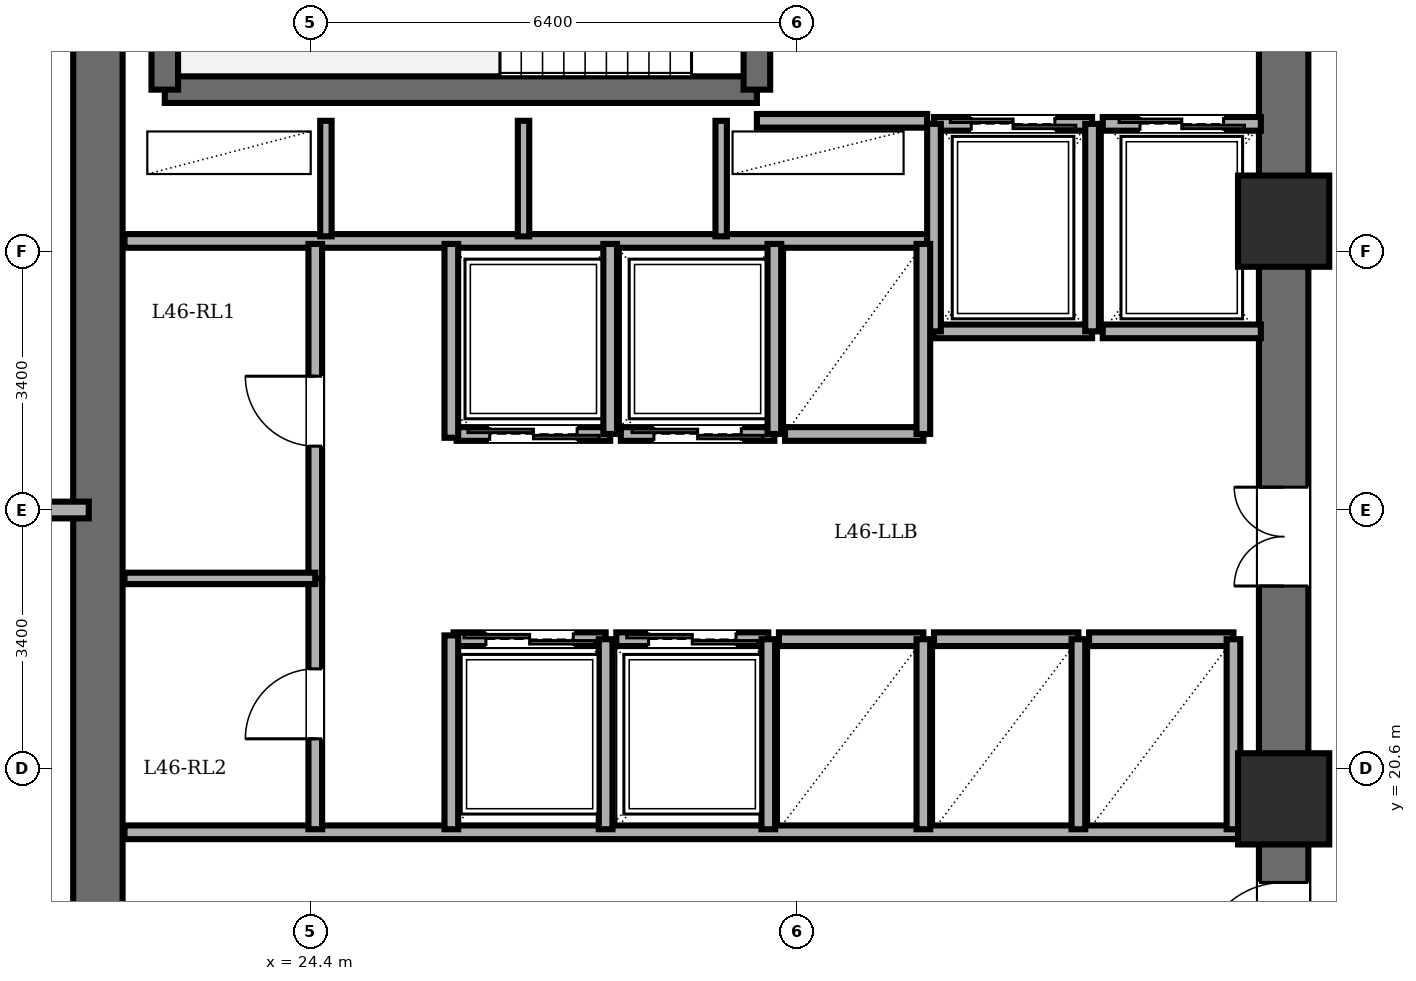
"""IFC4 building model, lengths in metres.
Left out: names, types, materials, properties, quantities, classifications, styles, units other than length and angle.
Written with IfcOpenShell. Run it as: python <this file> out.ifc"""

import sys

from ifc_helpers import new_model, si_unit, direction, frame, frame_2d, origin, origin_2d, place, context, subcontext, project, spatial, rectangle, extrude, element, fill, save


model = new_model("IFC4")
c1 = context("Model", 3, precision=1e-05, world=origin(), true_north=direction((0.0, 1.0)))
c2 = subcontext(c1, "Body", "Model", "MODEL_VIEW")
j1 = project(units=[si_unit("LENGTHUNIT", "METRE"), si_unit("PLANEANGLEUNIT", "RADIAN")], contexts=[c1])
p1 = place(None, origin())
s1 = spatial("IfcSite", under=j1, at=p1, CompositionType="ELEMENT")
p2 = place(p1, origin())
s2 = spatial("IfcBuilding", under=s1, at=p2, CompositionType="ELEMENT")
p3 = place(p2, frame((0.0, 0.0, 176.2)))
s3 = spatial("IfcBuildingStorey", under=s2, at=p3, CompositionType="ELEMENT", Elevation=176.2)
for number, where, z_axis, x_axis in (
    (1, (37.2, 20.2, 0.0), (0.0, 0.0, 1.0), (1.0, 0.0, 0.0)),
    (2, (37.2, 27.8, 0.0), (0.0, 0.0, 1.0), (1.0, 0.0, 0.0)),
):
    element("IfcColumn", number, at=place(p3, frame(where, z_axis=z_axis, x_axis=x_axis)), inside=s3, PredefinedType="COLUMN", context=c2, shape_type="SweptSolid", body=[
        extrude(rectangle(XDim=1.2, YDim=1.2, at=origin_2d()), origin(), (0.0, 0.0, 1.0), 3.6),
    ])
p4 = place(p3, frame((21.6, 14.4, 0.0), z_axis=(0.0, 0.0, 1.0), x_axis=(0.0, 1.0, 0.0)))
e3 = element("IfcWall", 3, at=p4, inside=s3, PredefinedType="SHEAR", context=c2, shape_type="SweptSolid", body=[
    extrude(rectangle(XDim=19.2, YDim=0.65, at=frame_2d((9.6, 0.0))), origin(), (0.0, 0.0, 1.0), 3.4),
])
p5 = place(p3, frame((37.2, 14.4, 0.0), z_axis=(0.0, 0.0, 1.0), x_axis=(0.0, 1.0, 0.0)))
e4 = element("IfcWall", 4, at=p5, inside=s3, PredefinedType="SHEAR", context=c2, shape_type="SweptSolid", body=[
    extrude(rectangle(XDim=19.2, YDim=0.65, at=frame_2d((9.6, 0.0))), origin(), (0.0, 0.0, 1.0), 3.4),
])
p6 = place(p5, frame((15.8, 0.0, 0.0)))
e5 = element("IfcOpeningElement", 5, at=p6, cuts=e4, PredefinedType="OPENING", context=c2, shape_type="SweptSolid", body=[
    extrude(rectangle(XDim=1.15, YDim=2.15, at=frame_2d((0.575, 1.075))), frame((0.0, 0.335, 0.0), z_axis=(0.0, -1.0, 0.0), x_axis=(1.0, 0.0, 0.0)), (0.0, 0.0, 1.0), 0.67),
])
p7 = place(p5, frame((3.6, 0.0, 0.0)))
e6 = element("IfcOpeningElement", 6, at=p7, cuts=e4, PredefinedType="OPENING", context=c2, shape_type="SweptSolid", body=[
    extrude(rectangle(XDim=1.1, YDim=2.15, at=frame_2d((0.55, 1.075))), frame((0.0, 0.335, 0.0), z_axis=(0.0, -1.0, 0.0), x_axis=(1.0, 0.0, 0.0)), (0.0, 0.0, 1.0), 0.67),
])
p8 = place(p5, frame((8.6, 0.0, 0.0)))
e7 = element("IfcOpeningElement", 7, at=p8, cuts=e4, PredefinedType="OPENING", context=c2, shape_type="SweptSolid", body=[
    extrude(rectangle(XDim=1.3, YDim=2.2, at=frame_2d((0.65, 1.1))), frame((0.0, 0.335, 0.0), z_axis=(0.0, -1.0, 0.0), x_axis=(1.0, 0.0, 0.0)), (0.0, 0.0, 1.0), 0.67),
])
p9 = place(p3, frame((22.48, 29.53, 0.0), z_axis=(0.0, 0.0, 1.0), x_axis=(1.0, 0.0, 0.0)))
e8 = element("IfcWall", 8, at=p9, inside=s3, PredefinedType="SOLIDWALL", context=c2, shape_type="SweptSolid", body=[
    extrude(rectangle(XDim=7.79, YDim=0.35, at=frame_2d((3.895, 0.0))), origin(), (0.0, 0.0, 1.0), 3.4),
])
p10 = place(p3, frame((22.48, 29.53, 0.0), z_axis=(0.0, 0.0, 1.0), x_axis=(0.0, 1.0, 0.0)))
e9 = element("IfcWall", 9, at=p10, inside=s3, PredefinedType="SOLIDWALL", context=c2, shape_type="SweptSolid", body=[
    extrude(rectangle(XDim=3.58, YDim=0.35, at=frame_2d((1.79, 0.0))), origin(), (0.0, 0.0, 1.0), 3.4),
])
p11 = place(p3, frame((30.27, 29.53, 0.0), z_axis=(0.0, 0.0, 1.0), x_axis=(0.0, 1.0, 0.0)))
e10 = element("IfcWall", 10, at=p11, inside=s3, PredefinedType="SOLIDWALL", context=c2, shape_type="SweptSolid", body=[
    extrude(rectangle(XDim=3.58, YDim=0.35, at=frame_2d((1.79, 0.0))), origin(), (0.0, 0.0, 1.0), 3.4),
])
p12 = place(p11, frame((1.25, 0.0, 0.0)))
e11 = element("IfcOpeningElement", 11, at=p12, cuts=e10, PredefinedType="OPENING", context=c2, shape_type="SweptSolid", body=[
    extrude(rectangle(XDim=1.1, YDim=2.15, at=frame_2d((0.55, 1.075))), frame((0.0, 0.185, 0.0), z_axis=(0.0, -1.0, 0.0), x_axis=(1.0, 0.0, 0.0)), (0.0, 0.0, 1.0), 0.37),
])
p13 = place(p3, frame((30.27, 29.12, 0.0), z_axis=(0.0, 0.0, 1.0), x_axis=(1.0, 0.0, 0.0)))
e12 = element("IfcWall", 12, at=p13, inside=s3, PredefinedType="PARTITIONING", context=c2, shape_type="SweptSolid", body=[
    extrude(rectangle(XDim=2.24, YDim=0.18, at=frame_2d((1.12, 0.0))), origin(), (0.0, 0.0, 1.0), 3.4),
])
p14 = place(p3, frame((21.95, 27.54, 0.0), z_axis=(0.0, 0.0, 1.0), x_axis=(1.0, 0.0, 0.0)))
e13 = element("IfcWall", 13, at=p14, inside=s3, PredefinedType="PARTITIONING", context=c2, shape_type="SweptSolid", body=[
    extrude(rectangle(XDim=10.56, YDim=0.18, at=frame_2d((5.28, 0.0))), origin(), (0.0, 0.0, 1.0), 3.4),
])
for number, where, z_axis, x_axis in (
    (14, (24.6, 27.6, 0.0), (0.0, 0.0, 1.0), (0.0, 1.0, 0.0)),
    (15, (27.2, 27.6, 0.0), (0.0, 0.0, 1.0), (0.0, 1.0, 0.0)),
    (16, (29.8, 27.6, 0.0), (0.0, 0.0, 1.0), (0.0, 1.0, 0.0)),
):
    element("IfcWall", number, at=place(p3, frame(where, z_axis=z_axis, x_axis=x_axis)), inside=s3, PredefinedType="PARTITIONING", context=c2, shape_type="SweptSolid", body=[
        extrude(rectangle(XDim=1.52, YDim=0.15, at=frame_2d((0.76, 0.0))), origin(), (0.0, 0.0, 1.0), 3.4),
    ])
p15 = place(p3, frame((21.95, 19.76, 0.0), z_axis=(0.0, 0.0, 1.0), x_axis=(1.0, 0.0, 0.0)))
e17 = element("IfcWall", 17, at=p15, inside=s3, PredefinedType="PARTITIONING", context=c2, shape_type="SweptSolid", body=[
    extrude(rectangle(XDim=14.87, YDim=0.18, at=frame_2d((7.435, 0.0))), origin(), (0.0, 0.0, 1.0), 3.4),
])
p16 = place(p3, frame((32.6, 29.08, 0.0), z_axis=(0.0, 0.0, 1.0), x_axis=(1.0, 0.0, 0.0)))
e18 = element("IfcWall", 18, at=p16, inside=s3, PredefinedType="PARTITIONING", context=c2, shape_type="SweptSolid", body=[
    extrude(rectangle(XDim=2.08, YDim=0.18, at=frame_2d((1.04, 0.0))), origin(), (0.0, 0.0, 1.0), 3.4),
])
p17 = place(p16, frame((0.49, 0.0, 0.0)))
e19 = element("IfcOpeningElement", 19, at=p17, cuts=e18, PredefinedType="OPENING", context=c2, shape_type="SweptSolid", body=[
    extrude(rectangle(XDim=1.1, YDim=2.2, at=frame_2d((0.55, 1.1))), frame((0.0, 0.1, 0.0), z_axis=(0.0, -1.0, 0.0), x_axis=(1.0, 0.0, 0.0)), (0.0, 0.0, 1.0), 0.2),
])
p18 = place(p3, frame((34.68, 26.35, 0.0), z_axis=(0.0, 0.0, 1.0), x_axis=(-1.0, 0.0, 0.0)))
e20 = element("IfcWall", 20, at=p18, inside=s3, PredefinedType="PARTITIONING", context=c2, shape_type="SweptSolid", body=[
    extrude(rectangle(XDim=2.08, YDim=0.18, at=frame_2d((1.04, 0.0))), origin(), (0.0, 0.0, 1.0), 3.4),
])
for number, where, z_axis, x_axis in (
    (21, (34.68, 26.35, 0.0), (0.0, 0.0, 1.0), (0.0, 1.0, 0.0)),
    (22, (32.6, 29.08, 0.0), (0.0, 0.0, 1.0), (0.0, -1.0, 0.0)),
):
    element("IfcWall", number, at=place(p3, frame(where, z_axis=z_axis, x_axis=x_axis)), inside=s3, PredefinedType="PARTITIONING", context=c2, shape_type="SweptSolid", body=[
        extrude(rectangle(XDim=2.73, YDim=0.18, at=frame_2d((1.365, 0.0))), origin(), (0.0, 0.0, 1.0), 3.4),
    ])
p19 = place(p3, frame((34.82, 29.08, 0.0), z_axis=(0.0, 0.0, 1.0), x_axis=(1.0, 0.0, 0.0)))
e23 = element("IfcWall", 23, at=p19, inside=s3, PredefinedType="PARTITIONING", context=c2, shape_type="SweptSolid", body=[
    extrude(rectangle(XDim=2.08, YDim=0.18, at=frame_2d((1.04, 0.0))), origin(), (0.0, 0.0, 1.0), 3.4),
])
p20 = place(p19, frame((0.49, 0.0, 0.0)))
e24 = element("IfcOpeningElement", 24, at=p20, cuts=e23, PredefinedType="OPENING", context=c2, shape_type="SweptSolid", body=[
    extrude(rectangle(XDim=1.1, YDim=2.2, at=frame_2d((0.55, 1.1))), frame((0.0, 0.1, 0.0), z_axis=(0.0, -1.0, 0.0), x_axis=(1.0, 0.0, 0.0)), (0.0, 0.0, 1.0), 0.2),
])
p21 = place(p3, frame((36.9, 26.35, 0.0), z_axis=(0.0, 0.0, 1.0), x_axis=(-1.0, 0.0, 0.0)))
e25 = element("IfcWall", 25, at=p21, inside=s3, PredefinedType="PARTITIONING", context=c2, shape_type="SweptSolid", body=[
    extrude(rectangle(XDim=2.08, YDim=0.18, at=frame_2d((1.04, 0.0))), origin(), (0.0, 0.0, 1.0), 3.4),
])
p22 = place(p3, frame((28.34, 25.0, 0.0), z_axis=(0.0, 0.0, 1.0), x_axis=(-1.0, 0.0, 0.0)))
e26 = element("IfcWall", 26, at=p22, inside=s3, PredefinedType="PARTITIONING", context=c2, shape_type="SweptSolid", body=[
    extrude(rectangle(XDim=2.02, YDim=0.18, at=frame_2d((1.01, 0.0))), origin(), (0.0, 0.0, 1.0), 3.4),
])
p23 = place(p22, frame((0.435, 0.0, 0.0)))
e27 = element("IfcOpeningElement", 27, at=p23, cuts=e26, PredefinedType="OPENING", context=c2, shape_type="SweptSolid", body=[
    extrude(rectangle(XDim=1.15, YDim=2.2, at=frame_2d((0.575, 1.1))), frame((0.0, 0.1, 0.0), z_axis=(0.0, -1.0, 0.0), x_axis=(1.0, 0.0, 0.0)), (0.0, 0.0, 1.0), 0.2),
])
p24 = place(p3, frame((28.34, 25.0, 0.0), z_axis=(0.0, 0.0, 1.0), x_axis=(0.0, 1.0, 0.0)))
e28 = element("IfcWall", 28, at=p24, inside=s3, PredefinedType="PARTITIONING", context=c2, shape_type="SweptSolid", body=[
    extrude(rectangle(XDim=2.5, YDim=0.18, at=frame_2d((1.25, 0.0))), origin(), (0.0, 0.0, 1.0), 3.4),
])
p25 = place(p3, frame((30.5, 25.0, 0.0), z_axis=(0.0, 0.0, 1.0), x_axis=(-1.0, 0.0, 0.0)))
e29 = element("IfcWall", 29, at=p25, inside=s3, PredefinedType="PARTITIONING", context=c2, shape_type="SweptSolid", body=[
    extrude(rectangle(XDim=2.02, YDim=0.18, at=frame_2d((1.01, 0.0))), origin(), (0.0, 0.0, 1.0), 3.4),
])
p26 = place(p25, frame((0.435, 0.0, 0.0)))
e30 = element("IfcOpeningElement", 30, at=p26, cuts=e29, PredefinedType="OPENING", context=c2, shape_type="SweptSolid", body=[
    extrude(rectangle(XDim=1.15, YDim=2.2, at=frame_2d((0.575, 1.1))), frame((0.0, 0.1, 0.0), z_axis=(0.0, -1.0, 0.0), x_axis=(1.0, 0.0, 0.0)), (0.0, 0.0, 1.0), 0.2),
])
p27 = place(p3, frame((30.5, 25.0, 0.0), z_axis=(0.0, 0.0, 1.0), x_axis=(0.0, 1.0, 0.0)))
e31 = element("IfcWall", 31, at=p27, inside=s3, PredefinedType="PARTITIONING", context=c2, shape_type="SweptSolid", body=[
    extrude(rectangle(XDim=2.5, YDim=0.18, at=frame_2d((1.25, 0.0))), origin(), (0.0, 0.0, 1.0), 3.4),
])
p28 = place(p3, frame((26.28, 22.3, 0.0), z_axis=(0.0, 0.0, 1.0), x_axis=(1.0, 0.0, 0.0)))
e32 = element("IfcWall", 32, at=p28, inside=s3, PredefinedType="PARTITIONING", context=c2, shape_type="SweptSolid", body=[
    extrude(rectangle(XDim=2.0, YDim=0.18, at=frame_2d((1.0, 0.0))), origin(), (0.0, 0.0, 1.0), 3.4),
])
p29 = place(p28, frame((0.425, 0.0, 0.0)))
e33 = element("IfcOpeningElement", 33, at=p29, cuts=e32, PredefinedType="OPENING", context=c2, shape_type="SweptSolid", body=[
    extrude(rectangle(XDim=1.15, YDim=2.2, at=frame_2d((0.575, 1.1))), frame((0.0, 0.1, 0.0), z_axis=(0.0, -1.0, 0.0), x_axis=(1.0, 0.0, 0.0)), (0.0, 0.0, 1.0), 0.2),
])
p30 = place(p3, frame((28.28, 19.8, 0.0), z_axis=(0.0, 0.0, 1.0), x_axis=(0.0, 1.0, 0.0)))
e34 = element("IfcWall", 34, at=p30, inside=s3, PredefinedType="PARTITIONING", context=c2, shape_type="SweptSolid", body=[
    extrude(rectangle(XDim=2.5, YDim=0.18, at=frame_2d((1.25, 0.0))), origin(), (0.0, 0.0, 1.0), 3.4),
])
p31 = place(p3, frame((28.42, 22.3, 0.0), z_axis=(0.0, 0.0, 1.0), x_axis=(1.0, 0.0, 0.0)))
e35 = element("IfcWall", 35, at=p31, inside=s3, PredefinedType="PARTITIONING", context=c2, shape_type="SweptSolid", body=[
    extrude(rectangle(XDim=2.0, YDim=0.18, at=frame_2d((1.0, 0.0))), origin(), (0.0, 0.0, 1.0), 3.4),
])
p32 = place(p31, frame((0.425, 0.0, 0.0)))
e36 = element("IfcOpeningElement", 36, at=p32, cuts=e35, PredefinedType="OPENING", context=c2, shape_type="SweptSolid", body=[
    extrude(rectangle(XDim=1.15, YDim=2.2, at=frame_2d((0.575, 1.1))), frame((0.0, 0.1, 0.0), z_axis=(0.0, -1.0, 0.0), x_axis=(1.0, 0.0, 0.0)), (0.0, 0.0, 1.0), 0.2),
])
p33 = place(p3, frame((30.42, 19.8, 0.0), z_axis=(0.0, 0.0, 1.0), x_axis=(0.0, 1.0, 0.0)))
e37 = element("IfcWall", 37, at=p33, inside=s3, PredefinedType="PARTITIONING", context=c2, shape_type="SweptSolid", body=[
    extrude(rectangle(XDim=2.5, YDim=0.18, at=frame_2d((1.25, 0.0))), origin(), (0.0, 0.0, 1.0), 3.4),
])
p34 = place(p3, frame((32.46, 25.0, 0.0), z_axis=(0.0, 0.0, 1.0), x_axis=(-1.0, 0.0, 0.0)))
e38 = element("IfcWall", 38, at=p34, inside=s3, PredefinedType="PARTITIONING", context=c2, shape_type="SweptSolid", body=[
    extrude(rectangle(XDim=1.82, YDim=0.18, at=frame_2d((0.91, 0.0))), origin(), (0.0, 0.0, 1.0), 3.4),
])
p35 = place(p3, frame((32.46, 25.0, 0.0), z_axis=(0.0, 0.0, 1.0), x_axis=(0.0, 1.0, 0.0)))
e39 = element("IfcWall", 39, at=p35, inside=s3, PredefinedType="PARTITIONING", context=c2, shape_type="SweptSolid", body=[
    extrude(rectangle(XDim=2.5, YDim=0.18, at=frame_2d((1.25, 0.0))), origin(), (0.0, 0.0, 1.0), 3.4),
])
p36 = place(p3, frame((30.56, 22.3, 0.0), z_axis=(0.0, 0.0, 1.0), x_axis=(1.0, 0.0, 0.0)))
e40 = element("IfcWall", 40, at=p36, inside=s3, PredefinedType="PARTITIONING", context=c2, shape_type="SweptSolid", body=[
    extrude(rectangle(XDim=1.9, YDim=0.18, at=frame_2d((0.95, 0.0))), origin(), (0.0, 0.0, 1.0), 3.4),
])
p37 = place(p3, frame((32.46, 19.8, 0.0), z_axis=(0.0, 0.0, 1.0), x_axis=(0.0, 1.0, 0.0)))
e41 = element("IfcWall", 41, at=p37, inside=s3, PredefinedType="PARTITIONING", context=c2, shape_type="SweptSolid", body=[
    extrude(rectangle(XDim=2.5, YDim=0.18, at=frame_2d((1.25, 0.0))), origin(), (0.0, 0.0, 1.0), 3.4),
])
p38 = place(p3, frame((32.6, 22.3, 0.0), z_axis=(0.0, 0.0, 1.0), x_axis=(1.0, 0.0, 0.0)))
e42 = element("IfcWall", 42, at=p38, inside=s3, PredefinedType="PARTITIONING", context=c2, shape_type="SweptSolid", body=[
    extrude(rectangle(XDim=1.9, YDim=0.18, at=frame_2d((0.95, 0.0))), origin(), (0.0, 0.0, 1.0), 3.4),
])
p39 = place(p3, frame((34.5, 19.8, 0.0), z_axis=(0.0, 0.0, 1.0), x_axis=(0.0, 1.0, 0.0)))
e43 = element("IfcWall", 43, at=p39, inside=s3, PredefinedType="PARTITIONING", context=c2, shape_type="SweptSolid", body=[
    extrude(rectangle(XDim=2.5, YDim=0.18, at=frame_2d((1.25, 0.0))), origin(), (0.0, 0.0, 1.0), 3.4),
])
p40 = place(p3, frame((34.64, 22.3, 0.0), z_axis=(0.0, 0.0, 1.0), x_axis=(1.0, 0.0, 0.0)))
e44 = element("IfcWall", 44, at=p40, inside=s3, PredefinedType="PARTITIONING", context=c2, shape_type="SweptSolid", body=[
    extrude(rectangle(XDim=1.9, YDim=0.18, at=frame_2d((0.95, 0.0))), origin(), (0.0, 0.0, 1.0), 3.4),
])
p41 = place(p3, frame((36.54, 19.8, 0.0), z_axis=(0.0, 0.0, 1.0), x_axis=(0.0, 1.0, 0.0)))
e45 = element("IfcWall", 45, at=p41, inside=s3, PredefinedType="PARTITIONING", context=c2, shape_type="SweptSolid", body=[
    extrude(rectangle(XDim=2.5, YDim=0.18, at=frame_2d((1.25, 0.0))), origin(), (0.0, 0.0, 1.0), 3.4),
])
p42 = place(p3, frame((24.46, 23.1, 0.0), z_axis=(0.0, 0.0, 1.0), x_axis=(0.0, 1.0, 0.0)))
e46 = element("IfcWall", 46, at=p42, inside=s3, PredefinedType="PARTITIONING", context=c2, shape_type="SweptSolid", body=[
    extrude(rectangle(XDim=4.4, YDim=0.18, at=frame_2d((2.2, 0.0))), origin(), (0.0, 0.0, 1.0), 3.4),
])
p43 = place(p42, frame((1.74, 0.0, 0.0)))
e47 = element("IfcOpeningElement", 47, at=p43, cuts=e46, PredefinedType="OPENING", context=c2, shape_type="SweptSolid", body=[
    extrude(rectangle(XDim=0.92, YDim=2.1, at=frame_2d((0.46, 1.05))), frame((0.0, 0.1, 0.0), z_axis=(0.0, -1.0, 0.0), x_axis=(1.0, 0.0, 0.0)), (0.0, 0.0, 1.0), 0.2),
])
p44 = place(p3, frame((24.46, 19.8, 0.0), z_axis=(0.0, 0.0, 1.0), x_axis=(0.0, 1.0, 0.0)))
e48 = element("IfcWall", 48, at=p44, inside=s3, PredefinedType="PARTITIONING", context=c2, shape_type="SweptSolid", body=[
    extrude(rectangle(XDim=3.3, YDim=0.18, at=frame_2d((1.65, 0.0))), origin(), (0.0, 0.0, 1.0), 3.4),
])
p45 = place(p44, frame((1.19, 0.0, 0.0)))
e49 = element("IfcOpeningElement", 49, at=p45, cuts=e48, PredefinedType="OPENING", context=c2, shape_type="SweptSolid", body=[
    extrude(rectangle(XDim=0.92, YDim=2.1, at=frame_2d((0.46, 1.05))), frame((0.0, 0.1, 0.0), z_axis=(0.0, -1.0, 0.0), x_axis=(1.0, 0.0, 0.0)), (0.0, 0.0, 1.0), 0.2),
])
p46 = place(p3, frame((21.95, 23.1, 0.0), z_axis=(0.0, 0.0, 1.0), x_axis=(1.0, 0.0, 0.0)))
e50 = element("IfcWall", 50, at=p46, inside=s3, PredefinedType="PARTITIONING", context=c2, shape_type="SweptSolid", body=[
    extrude(rectangle(XDim=2.51, YDim=0.15, at=frame_2d((1.255, 0.0))), origin(), (0.0, 0.0, 1.0), 3.4),
])
for number, where, z_axis, x_axis in (
    (51, (26.25, 24.95, 0.0), (0.0, 0.0, 1.0), (0.0, 1.0, 0.0)),
    (52, (26.25, 19.8, 0.0), (0.0, 0.0, 1.0), (0.0, 1.0, 0.0)),
):
    element("IfcWall", number, at=place(p3, frame(where, z_axis=z_axis, x_axis=x_axis)), inside=s3, PredefinedType="PARTITIONING", context=c2, shape_type="SweptSolid", body=[
        extrude(rectangle(XDim=2.55, YDim=0.18, at=frame_2d((1.275, 0.0))), origin(), (0.0, 0.0, 1.0), 3.4),
    ])
p47 = place(p3, frame((13.8, 24.0, 0.0), z_axis=(0.0, 0.0, 1.0), x_axis=(1.0, 0.0, 0.0)))
e53 = element("IfcWall", 53, at=p47, inside=s3, PredefinedType="PARTITIONING", context=c2, shape_type="SweptSolid", body=[
    extrude(rectangle(XDim=7.68, YDim=0.22, at=frame_2d((3.84, 0.0))), origin(), (0.0, 0.0, 1.0), 3.4),
])
p48 = place(p7, origin())
e54 = element("IfcDoor", 54, at=p48, inside=s3, OperationType="SINGLE_SWING_LEFT", PredefinedType="DOOR", context=c2, shape_type="SweptSolid", body=[
    extrude(rectangle(XDim=1.1, YDim=2.15, at=frame_2d((0.55, 1.075))), frame((0.0, 0.025, 0.0), z_axis=(0.0, -1.0, 0.0), x_axis=(1.0, 0.0, 0.0)), (0.0, 0.0, 1.0), 0.05),
])
fill(e6, e54)
p49 = place(p17, origin())
e55 = element("IfcDoor", 55, at=p49, inside=s3, OperationType="DOUBLE_DOOR_SLIDING", PredefinedType="DOOR", context=c2, shape_type="SweptSolid", body=[
    extrude(rectangle(XDim=1.1, YDim=2.2, at=frame_2d((0.55, 1.1))), frame((0.0, 0.025, 0.0), z_axis=(0.0, -1.0, 0.0), x_axis=(1.0, 0.0, 0.0)), (0.0, 0.0, 1.0), 0.05),
])
fill(e19, e55)
p50 = place(p20, origin())
e56 = element("IfcDoor", 56, at=p50, inside=s3, OperationType="DOUBLE_DOOR_SLIDING", PredefinedType="DOOR", context=c2, shape_type="SweptSolid", body=[
    extrude(rectangle(XDim=1.1, YDim=2.2, at=frame_2d((0.55, 1.1))), frame((0.0, 0.025, 0.0), z_axis=(0.0, -1.0, 0.0), x_axis=(1.0, 0.0, 0.0)), (0.0, 0.0, 1.0), 0.05),
])
fill(e24, e56)
p51 = place(p23, origin())
e57 = element("IfcDoor", 57, at=p51, inside=s3, OperationType="DOUBLE_DOOR_SLIDING", PredefinedType="DOOR", context=c2, shape_type="SweptSolid", body=[
    extrude(rectangle(XDim=1.15, YDim=2.2, at=frame_2d((0.575, 1.1))), frame((0.0, 0.025, 0.0), z_axis=(0.0, -1.0, 0.0), x_axis=(1.0, 0.0, 0.0)), (0.0, 0.0, 1.0), 0.05),
])
fill(e27, e57)
p52 = place(p26, origin())
e58 = element("IfcDoor", 58, at=p52, inside=s3, OperationType="DOUBLE_DOOR_SLIDING", PredefinedType="DOOR", context=c2, shape_type="SweptSolid", body=[
    extrude(rectangle(XDim=1.15, YDim=2.2, at=frame_2d((0.575, 1.1))), frame((0.0, 0.025, 0.0), z_axis=(0.0, -1.0, 0.0), x_axis=(1.0, 0.0, 0.0)), (0.0, 0.0, 1.0), 0.05),
])
fill(e30, e58)
p53 = place(p29, origin())
e59 = element("IfcDoor", 59, at=p53, inside=s3, OperationType="DOUBLE_DOOR_SLIDING", PredefinedType="DOOR", context=c2, shape_type="SweptSolid", body=[
    extrude(rectangle(XDim=1.15, YDim=2.2, at=frame_2d((0.575, 1.1))), frame((0.0, 0.025, 0.0), z_axis=(0.0, -1.0, 0.0), x_axis=(1.0, 0.0, 0.0)), (0.0, 0.0, 1.0), 0.05),
])
fill(e33, e59)
p54 = place(p32, origin())
e60 = element("IfcDoor", 60, at=p54, inside=s3, OperationType="DOUBLE_DOOR_SLIDING", PredefinedType="DOOR", context=c2, shape_type="SweptSolid", body=[
    extrude(rectangle(XDim=1.15, YDim=2.2, at=frame_2d((0.575, 1.1))), frame((0.0, 0.025, 0.0), z_axis=(0.0, -1.0, 0.0), x_axis=(1.0, 0.0, 0.0)), (0.0, 0.0, 1.0), 0.05),
])
fill(e36, e60)
p55 = place(p43, origin())
e61 = element("IfcDoor", 61, at=p55, inside=s3, OperationType="SINGLE_SWING_RIGHT", PredefinedType="DOOR", context=c2, shape_type="SweptSolid", body=[
    extrude(rectangle(XDim=0.92, YDim=2.1, at=frame_2d((0.46, 1.05))), frame((0.0, 0.025, 0.0), z_axis=(0.0, -1.0, 0.0), x_axis=(1.0, 0.0, 0.0)), (0.0, 0.0, 1.0), 0.05),
])
fill(e47, e61)
p56 = place(p45, origin())
e62 = element("IfcDoor", 62, at=p56, inside=s3, OperationType="SINGLE_SWING_LEFT", PredefinedType="DOOR", context=c2, shape_type="SweptSolid", body=[
    extrude(rectangle(XDim=0.92, YDim=2.1, at=frame_2d((0.46, 1.05))), frame((0.0, 0.025, 0.0), z_axis=(0.0, -1.0, 0.0), x_axis=(1.0, 0.0, 0.0)), (0.0, 0.0, 1.0), 0.05),
])
fill(e49, e62)
p57 = place(p8, origin())
e63 = element("IfcDoor", 63, at=p57, inside=s3, OperationType="DOUBLE_DOOR_SINGLE_SWING", PredefinedType="DOOR", context=c2, shape_type="SweptSolid", body=[
    extrude(rectangle(XDim=1.3, YDim=2.2, at=frame_2d((0.65, 1.1))), frame((0.0, 0.025, 0.0), z_axis=(0.0, -1.0, 0.0), x_axis=(1.0, 0.0, 0.0)), (0.0, 0.0, 1.0), 0.05),
])
fill(e7, e63)
save(model, sys.argv[1])
